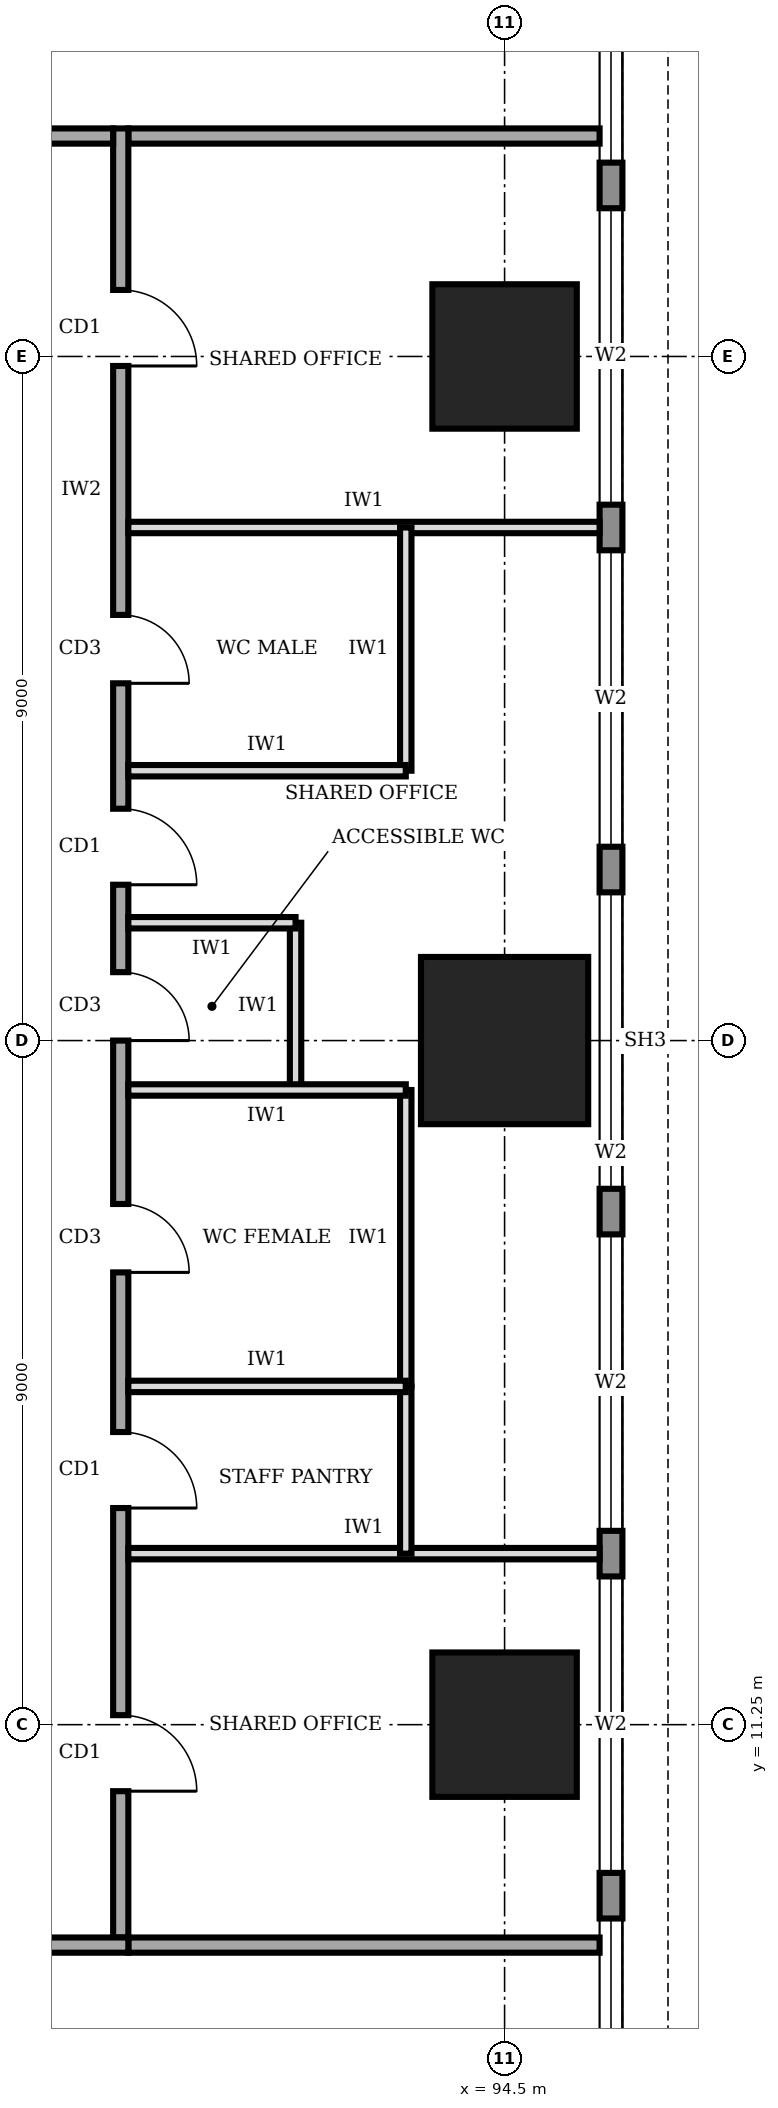
"""IFC4 building model, lengths in metres.
Left out: names, types, materials, properties, quantities, classifications, styles, units other than length and angle.
Written with IfcOpenShell. Run it as: python <this file> out.ifc"""

import sys

from ifc_helpers import new_model, si_unit, direction, frame, frame_2d, origin, origin_2d, place, context, subcontext, project, spatial, rectangle, extrude, element, fill, save


model = new_model("IFC4")
c1 = context("Model", 3, precision=1e-05, world=origin(), true_north=direction((0.0, 1.0)))
c2 = subcontext(c1, "Body", "Model", "MODEL_VIEW")
j1 = project(units=[si_unit("LENGTHUNIT", "METRE"), si_unit("PLANEANGLEUNIT", "RADIAN")], contexts=[c1])
p1 = place(None, origin())
s1 = spatial("IfcSite", under=j1, at=p1, CompositionType="ELEMENT")
p2 = place(p1, origin())
s2 = spatial("IfcBuilding", under=s1, at=p2, CompositionType="ELEMENT")
p3 = place(p2, frame((0.0, 0.0, 153.0)))
s3 = spatial("IfcBuildingStorey", under=s2, at=p3, CompositionType="ELEMENT", Elevation=153.0)
p4 = place(p3, frame((94.5, 11.25, 0.0), z_axis=(0.0, 0.0, 1.0), x_axis=(1.0, 0.0, 0.0)))
e1 = element("IfcColumn", 1, at=p4, inside=s3, PredefinedType="COLUMN", context=c2, shape_type="SweptSolid", body=[
    extrude(rectangle(XDim=1.9, YDim=1.9, at=origin_2d()), origin(), (0.0, 0.0, 1.0), 4.0),
])
p5 = place(p3, frame((94.5, 20.25, 0.0), z_axis=(0.0, 0.0, 1.0), x_axis=(1.0, 0.0, 0.0)))
e2 = element("IfcColumn", 2, at=p5, inside=s3, PredefinedType="COLUMN", context=c2, shape_type="SweptSolid", body=[
    extrude(rectangle(XDim=2.2, YDim=2.2, at=origin_2d()), origin(), (0.0, 0.0, 1.0), 4.0),
])
p6 = place(p3, frame((94.5, 29.25, 0.0), z_axis=(0.0, 0.0, 1.0), x_axis=(1.0, 0.0, 0.0)))
e3 = element("IfcColumn", 3, at=p6, inside=s3, PredefinedType="COLUMN", context=c2, shape_type="SweptSolid", body=[
    extrude(rectangle(XDim=1.9, YDim=1.9, at=origin_2d()), origin(), (0.0, 0.0, 1.0), 4.0),
])
p7 = place(p3, frame((95.9, 3.32, 0.0), z_axis=(0.0, 0.0, 1.0), x_axis=(0.0, 1.0, 0.0)))
e4 = element("IfcWall", 4, at=p7, inside=s3, PredefinedType="STANDARD", context=c2, shape_type="SweptSolid", body=[
    extrude(rectangle(XDim=33.86, YDim=0.3, at=frame_2d((16.93, 0.0))), origin(), (0.0, 0.0, 1.0), 3.75),
])
p8 = place(p7, frame((1.48, 0.0, 0.6)))
e5 = element("IfcOpeningElement", 5, at=p8, cuts=e4, PredefinedType="OPENING", context=c2, shape_type="SweptSolid", body=[
    extrude(rectangle(XDim=3.9, YDim=2.6, at=frame_2d((1.95, 1.3))), frame((0.0, 0.16, 0.0), z_axis=(0.0, -1.0, 0.0), x_axis=(1.0, 0.0, 0.0)), (0.0, 0.0, 1.0), 0.32),
])
p9 = place(p7, frame((5.98, 0.0, 0.6)))
e6 = element("IfcOpeningElement", 6, at=p9, cuts=e4, PredefinedType="OPENING", context=c2, shape_type="SweptSolid", body=[
    extrude(rectangle(XDim=3.9, YDim=2.6, at=frame_2d((1.95, 1.3))), frame((0.0, 0.16, 0.0), z_axis=(0.0, -1.0, 0.0), x_axis=(1.0, 0.0, 0.0)), (0.0, 0.0, 1.0), 0.32),
])
p10 = place(p7, frame((10.48, 0.0, 0.6)))
e7 = element("IfcOpeningElement", 7, at=p10, cuts=e4, PredefinedType="OPENING", context=c2, shape_type="SweptSolid", body=[
    extrude(rectangle(XDim=3.9, YDim=2.6, at=frame_2d((1.95, 1.3))), frame((0.0, 0.16, 0.0), z_axis=(0.0, -1.0, 0.0), x_axis=(1.0, 0.0, 0.0)), (0.0, 0.0, 1.0), 0.32),
])
p11 = place(p7, frame((14.98, 0.0, 0.6)))
e8 = element("IfcOpeningElement", 8, at=p11, cuts=e4, PredefinedType="OPENING", context=c2, shape_type="SweptSolid", body=[
    extrude(rectangle(XDim=3.9, YDim=2.6, at=frame_2d((1.95, 1.3))), frame((0.0, 0.16, 0.0), z_axis=(0.0, -1.0, 0.0), x_axis=(1.0, 0.0, 0.0)), (0.0, 0.0, 1.0), 0.32),
])
p12 = place(p7, frame((19.48, 0.0, 0.6)))
e9 = element("IfcOpeningElement", 9, at=p12, cuts=e4, PredefinedType="OPENING", context=c2, shape_type="SweptSolid", body=[
    extrude(rectangle(XDim=3.9, YDim=2.6, at=frame_2d((1.95, 1.3))), frame((0.0, 0.16, 0.0), z_axis=(0.0, -1.0, 0.0), x_axis=(1.0, 0.0, 0.0)), (0.0, 0.0, 1.0), 0.32),
])
p13 = place(p7, frame((23.98, 0.0, 0.6)))
e10 = element("IfcOpeningElement", 10, at=p13, cuts=e4, PredefinedType="OPENING", context=c2, shape_type="SweptSolid", body=[
    extrude(rectangle(XDim=3.9, YDim=2.6, at=frame_2d((1.95, 1.3))), frame((0.0, 0.16, 0.0), z_axis=(0.0, -1.0, 0.0), x_axis=(1.0, 0.0, 0.0)), (0.0, 0.0, 1.0), 0.32),
])
p14 = place(p7, frame((28.48, 0.0, 0.6)))
e11 = element("IfcOpeningElement", 11, at=p14, cuts=e4, PredefinedType="OPENING", context=c2, shape_type="SweptSolid", body=[
    extrude(rectangle(XDim=3.9, YDim=2.6, at=frame_2d((1.95, 1.3))), frame((0.0, 0.16, 0.0), z_axis=(0.0, -1.0, 0.0), x_axis=(1.0, 0.0, 0.0)), (0.0, 0.0, 1.0), 0.32),
])
p15 = place(p3, frame((63.3, 8.35, 0.0), z_axis=(0.0, 0.0, 1.0), x_axis=(1.0, 0.0, 0.0)))
e12 = element("IfcWall", 12, at=p15, inside=s3, PredefinedType="SOLIDWALL", context=c2, shape_type="SweptSolid", body=[
    extrude(rectangle(XDim=26.25, YDim=0.2, at=frame_2d((13.125, 0.0))), origin(), (0.0, 0.0, 1.0), 3.75),
])
p16 = place(p15, frame((6.0, 0.0, 0.0)))
e13 = element("IfcOpeningElement", 13, at=p16, cuts=e12, PredefinedType="OPENING", context=c2, shape_type="SweptSolid", body=[
    extrude(rectangle(XDim=1.0, YDim=2.1, at=frame_2d((0.5, 1.05))), frame((0.0, 0.11, 0.0), z_axis=(0.0, -1.0, 0.0), x_axis=(1.0, 0.0, 0.0)), (0.0, 0.0, 1.0), 0.22),
])
p17 = place(p15, frame((19.325, 0.0, 0.0)))
e14 = element("IfcOpeningElement", 14, at=p17, cuts=e12, PredefinedType="OPENING", context=c2, shape_type="SweptSolid", body=[
    extrude(rectangle(XDim=1.0, YDim=2.1, at=frame_2d((0.5, 1.05))), frame((0.0, 0.11, 0.0), z_axis=(0.0, -1.0, 0.0), x_axis=(1.0, 0.0, 0.0)), (0.0, 0.0, 1.0), 0.22),
])
p18 = place(p3, frame((89.45, 8.45, 0.0), z_axis=(0.0, 0.0, 1.0), x_axis=(0.0, 1.0, 0.0)))
e15 = element("IfcWall", 15, at=p18, inside=s3, PredefinedType="SOLIDWALL", context=c2, shape_type="SweptSolid", body=[
    extrude(rectangle(XDim=23.8, YDim=0.2, at=frame_2d((11.9, 0.0))), origin(), (0.0, 0.0, 1.0), 3.75),
])
p19 = place(p18, frame((1.925, 0.0, 0.0)))
e16 = element("IfcOpeningElement", 16, at=p19, cuts=e15, PredefinedType="OPENING", context=c2, shape_type="SweptSolid", body=[
    extrude(rectangle(XDim=1.0, YDim=2.1, at=frame_2d((0.5, 1.05))), frame((0.0, 0.11, 0.0), z_axis=(0.0, -1.0, 0.0), x_axis=(1.0, 0.0, 0.0)), (0.0, 0.0, 1.0), 0.22),
])
p20 = place(p18, frame((5.65, 0.0, 0.0)))
e17 = element("IfcOpeningElement", 17, at=p20, cuts=e15, PredefinedType="OPENING", context=c2, shape_type="SweptSolid", body=[
    extrude(rectangle(XDim=1.0, YDim=2.1, at=frame_2d((0.5, 1.05))), frame((0.0, 0.11, 0.0), z_axis=(0.0, -1.0, 0.0), x_axis=(1.0, 0.0, 0.0)), (0.0, 0.0, 1.0), 0.22),
])
p21 = place(p18, frame((8.75, 0.0, 0.0)))
e18 = element("IfcOpeningElement", 18, at=p21, cuts=e15, PredefinedType="OPENING", context=c2, shape_type="SweptSolid", body=[
    extrude(rectangle(XDim=0.9, YDim=2.1, at=frame_2d((0.45, 1.05))), frame((0.0, 0.11, 0.0), z_axis=(0.0, -1.0, 0.0), x_axis=(1.0, 0.0, 0.0)), (0.0, 0.0, 1.0), 0.22),
])
p22 = place(p18, frame((11.8, 0.0, 0.0)))
e19 = element("IfcOpeningElement", 19, at=p22, cuts=e15, PredefinedType="OPENING", context=c2, shape_type="SweptSolid", body=[
    extrude(rectangle(XDim=0.9, YDim=2.1, at=frame_2d((0.45, 1.05))), frame((0.0, 0.11, 0.0), z_axis=(0.0, -1.0, 0.0), x_axis=(1.0, 0.0, 0.0)), (0.0, 0.0, 1.0), 0.22),
])
p23 = place(p18, frame((16.5, 0.0, 0.0)))
e20 = element("IfcOpeningElement", 20, at=p23, cuts=e15, PredefinedType="OPENING", context=c2, shape_type="SweptSolid", body=[
    extrude(rectangle(XDim=0.9, YDim=2.1, at=frame_2d((0.45, 1.05))), frame((0.0, 0.11, 0.0), z_axis=(0.0, -1.0, 0.0), x_axis=(1.0, 0.0, 0.0)), (0.0, 0.0, 1.0), 0.22),
])
p24 = place(p18, frame((13.85, 0.0, 0.0)))
e21 = element("IfcOpeningElement", 21, at=p24, cuts=e15, PredefinedType="OPENING", context=c2, shape_type="SweptSolid", body=[
    extrude(rectangle(XDim=1.0, YDim=2.1, at=frame_2d((0.5, 1.05))), frame((0.0, 0.11, 0.0), z_axis=(0.0, -1.0, 0.0), x_axis=(1.0, 0.0, 0.0)), (0.0, 0.0, 1.0), 0.22),
])
p25 = place(p18, frame((20.675, 0.0, 0.0)))
e22 = element("IfcOpeningElement", 22, at=p25, cuts=e15, PredefinedType="OPENING", context=c2, shape_type="SweptSolid", body=[
    extrude(rectangle(XDim=1.0, YDim=2.1, at=frame_2d((0.5, 1.05))), frame((0.0, 0.11, 0.0), z_axis=(0.0, -1.0, 0.0), x_axis=(1.0, 0.0, 0.0)), (0.0, 0.0, 1.0), 0.22),
])
p26 = place(p3, frame((89.35, 32.15, 0.0), z_axis=(0.0, 0.0, 1.0), x_axis=(-1.0, 0.0, 0.0)))
e23 = element("IfcWall", 23, at=p26, inside=s3, PredefinedType="SOLIDWALL", context=c2, shape_type="SweptSolid", body=[
    extrude(rectangle(XDim=26.05, YDim=0.2, at=frame_2d((13.025, 0.0))), origin(), (0.0, 0.0, 1.0), 3.75),
])
p27 = place(p26, frame((16.4, 0.0, 0.0)))
e24 = element("IfcOpeningElement", 24, at=p27, cuts=e23, PredefinedType="OPENING", context=c2, shape_type="SweptSolid", body=[
    extrude(rectangle(XDim=1.8, YDim=2.1, at=frame_2d((0.9, 1.05))), frame((0.0, 0.11, 0.0), z_axis=(0.0, -1.0, 0.0), x_axis=(1.0, 0.0, 0.0)), (0.0, 0.0, 1.0), 0.22),
])
p28 = place(p26, frame((5.6, 0.0, 0.0)))
e25 = element("IfcOpeningElement", 25, at=p28, cuts=e23, PredefinedType="OPENING", context=c2, shape_type="SweptSolid", body=[
    extrude(rectangle(XDim=1.0, YDim=2.1, at=frame_2d((0.5, 1.05))), frame((0.0, 0.11, 0.0), z_axis=(0.0, -1.0, 0.0), x_axis=(1.0, 0.0, 0.0)), (0.0, 0.0, 1.0), 0.22),
])
p29 = place(p26, frame((1.325, 0.0, 0.0)))
e26 = element("IfcOpeningElement", 26, at=p29, cuts=e23, PredefinedType="OPENING", context=c2, shape_type="SweptSolid", body=[
    extrude(rectangle(XDim=1.0, YDim=2.1, at=frame_2d((0.5, 1.05))), frame((0.0, 0.11, 0.0), z_axis=(0.0, -1.0, 0.0), x_axis=(1.0, 0.0, 0.0)), (0.0, 0.0, 1.0), 0.22),
])
for number, where, z_axis, x_axis in (
    (27, (89.55, 8.35, 0.0), (0.0, 0.0, 1.0), (1.0, 0.0, 0.0)),
    (28, (89.55, 32.15, 0.0), (0.0, 0.0, 1.0), (1.0, 0.0, 0.0)),
):
    element("IfcWall", number, at=place(p3, frame(where, z_axis=z_axis, x_axis=x_axis)), inside=s3, PredefinedType="SOLIDWALL", context=c2, shape_type="SweptSolid", body=[
        extrude(rectangle(XDim=6.2, YDim=0.2, at=frame_2d((3.1, 0.0))), origin(), (0.0, 0.0, 1.0), 3.75),
    ])
for number, where, z_axis, x_axis in (
    (29, (89.55, 13.5, 0.0), (0.0, 0.0, 1.0), (1.0, 0.0, 0.0)),
    (30, (89.55, 27.0, 0.0), (0.0, 0.0, 1.0), (1.0, 0.0, 0.0)),
):
    element("IfcWall", number, at=place(p3, frame(where, z_axis=z_axis, x_axis=x_axis)), inside=s3, PredefinedType="PARTITIONING", context=c2, shape_type="SweptSolid", body=[
        extrude(rectangle(XDim=6.2, YDim=0.15, at=frame_2d((3.1, 0.0))), origin(), (0.0, 0.0, 1.0), 3.75),
    ])
p30 = place(p3, frame((89.55, 15.7, 0.0), z_axis=(0.0, 0.0, 1.0), x_axis=(1.0, 0.0, 0.0)))
e31 = element("IfcWall", 31, at=p30, inside=s3, PredefinedType="PARTITIONING", context=c2, shape_type="SweptSolid", body=[
    extrude(rectangle(XDim=3.65, YDim=0.15, at=frame_2d((1.825, 0.0))), origin(), (0.0, 0.0, 1.0), 3.75),
])
p31 = place(p3, frame((89.55, 19.6, 0.0), z_axis=(0.0, 0.0, 1.0), x_axis=(1.0, 0.0, 0.0)))
e32 = element("IfcWall", 32, at=p31, inside=s3, PredefinedType="PARTITIONING", context=c2, shape_type="SweptSolid", body=[
    extrude(rectangle(XDim=3.65, YDim=0.15, at=frame_2d((1.825, 0.0))), origin(), (0.0, 0.0, 1.0), 2.85),
])
p32 = place(p3, frame((89.55, 21.8, 0.0), z_axis=(0.0, 0.0, 1.0), x_axis=(1.0, 0.0, 0.0)))
e33 = element("IfcWall", 33, at=p32, inside=s3, PredefinedType="PARTITIONING", context=c2, shape_type="SweptSolid", body=[
    extrude(rectangle(XDim=2.2, YDim=0.15, at=frame_2d((1.1, 0.0))), origin(), (0.0, 0.0, 1.0), 3.75),
])
p33 = place(p3, frame((89.55, 23.8, 0.0), z_axis=(0.0, 0.0, 1.0), x_axis=(1.0, 0.0, 0.0)))
e34 = element("IfcWall", 34, at=p33, inside=s3, PredefinedType="PARTITIONING", context=c2, shape_type="SweptSolid", body=[
    extrude(rectangle(XDim=3.65, YDim=0.15, at=frame_2d((1.825, 0.0))), origin(), (0.0, 0.0, 1.0), 3.75),
])
p34 = place(p3, frame((93.2, 13.5, 0.0), z_axis=(0.0, 0.0, 1.0), x_axis=(0.0, 1.0, 0.0)))
e35 = element("IfcWall", 35, at=p34, inside=s3, PredefinedType="PARTITIONING", context=c2, shape_type="SweptSolid", body=[
    extrude(rectangle(XDim=2.2, YDim=0.15, at=frame_2d((1.1, 0.0))), origin(), (0.0, 0.0, 1.0), 3.75),
])
p35 = place(p3, frame((93.2, 15.7, 0.0), z_axis=(0.0, 0.0, 1.0), x_axis=(0.0, 1.0, 0.0)))
e36 = element("IfcWall", 36, at=p35, inside=s3, PredefinedType="PARTITIONING", context=c2, shape_type="SweptSolid", body=[
    extrude(rectangle(XDim=3.9, YDim=0.15, at=frame_2d((1.95, 0.0))), origin(), (0.0, 0.0, 1.0), 3.75),
])
p36 = place(p3, frame((91.75, 19.6, 0.0), z_axis=(0.0, 0.0, 1.0), x_axis=(0.0, 1.0, 0.0)))
e37 = element("IfcWall", 37, at=p36, inside=s3, PredefinedType="PARTITIONING", context=c2, shape_type="SweptSolid", body=[
    extrude(rectangle(XDim=2.2, YDim=0.15, at=frame_2d((1.1, 0.0))), origin(), (0.0, 0.0, 1.0), 3.75),
])
p37 = place(p3, frame((93.2, 23.8, 0.0), z_axis=(0.0, 0.0, 1.0), x_axis=(0.0, 1.0, 0.0)))
e38 = element("IfcWall", 38, at=p37, inside=s3, PredefinedType="PARTITIONING", context=c2, shape_type="SweptSolid", body=[
    extrude(rectangle(XDim=3.2, YDim=0.15, at=frame_2d((1.6, 0.0))), origin(), (0.0, 0.0, 1.0), 3.75),
])
p38 = place(p8, origin())
e39 = element("IfcWindow", 39, at=p38, inside=s3, PartitioningType="SINGLE_PANEL", PredefinedType="WINDOW", context=c2, shape_type="SweptSolid", body=[
    extrude(rectangle(XDim=3.9, YDim=2.6, at=frame_2d((1.95, 1.3))), frame((0.0, 0.03, 0.0), z_axis=(0.0, -1.0, 0.0), x_axis=(1.0, 0.0, 0.0)), (0.0, 0.0, 1.0), 0.06),
])
fill(e5, e39)
p39 = place(p9, origin())
e40 = element("IfcWindow", 40, at=p39, inside=s3, PartitioningType="SINGLE_PANEL", PredefinedType="WINDOW", context=c2, shape_type="SweptSolid", body=[
    extrude(rectangle(XDim=3.9, YDim=2.6, at=frame_2d((1.95, 1.3))), frame((0.0, 0.03, 0.0), z_axis=(0.0, -1.0, 0.0), x_axis=(1.0, 0.0, 0.0)), (0.0, 0.0, 1.0), 0.06),
])
fill(e6, e40)
p40 = place(p10, origin())
e41 = element("IfcWindow", 41, at=p40, inside=s3, PartitioningType="SINGLE_PANEL", PredefinedType="WINDOW", context=c2, shape_type="SweptSolid", body=[
    extrude(rectangle(XDim=3.9, YDim=2.6, at=frame_2d((1.95, 1.3))), frame((0.0, 0.03, 0.0), z_axis=(0.0, -1.0, 0.0), x_axis=(1.0, 0.0, 0.0)), (0.0, 0.0, 1.0), 0.06),
])
fill(e7, e41)
p41 = place(p11, origin())
e42 = element("IfcWindow", 42, at=p41, inside=s3, PartitioningType="SINGLE_PANEL", PredefinedType="WINDOW", context=c2, shape_type="SweptSolid", body=[
    extrude(rectangle(XDim=3.9, YDim=2.6, at=frame_2d((1.95, 1.3))), frame((0.0, 0.03, 0.0), z_axis=(0.0, -1.0, 0.0), x_axis=(1.0, 0.0, 0.0)), (0.0, 0.0, 1.0), 0.06),
])
fill(e8, e42)
p42 = place(p12, origin())
e43 = element("IfcWindow", 43, at=p42, inside=s3, PartitioningType="SINGLE_PANEL", PredefinedType="WINDOW", context=c2, shape_type="SweptSolid", body=[
    extrude(rectangle(XDim=3.9, YDim=2.6, at=frame_2d((1.95, 1.3))), frame((0.0, 0.03, 0.0), z_axis=(0.0, -1.0, 0.0), x_axis=(1.0, 0.0, 0.0)), (0.0, 0.0, 1.0), 0.06),
])
fill(e9, e43)
p43 = place(p13, origin())
e44 = element("IfcWindow", 44, at=p43, inside=s3, PartitioningType="SINGLE_PANEL", PredefinedType="WINDOW", context=c2, shape_type="SweptSolid", body=[
    extrude(rectangle(XDim=3.9, YDim=2.6, at=frame_2d((1.95, 1.3))), frame((0.0, 0.03, 0.0), z_axis=(0.0, -1.0, 0.0), x_axis=(1.0, 0.0, 0.0)), (0.0, 0.0, 1.0), 0.06),
])
fill(e10, e44)
p44 = place(p14, origin())
e45 = element("IfcWindow", 45, at=p44, inside=s3, PartitioningType="SINGLE_PANEL", PredefinedType="WINDOW", context=c2, shape_type="SweptSolid", body=[
    extrude(rectangle(XDim=3.9, YDim=2.6, at=frame_2d((1.95, 1.3))), frame((0.0, 0.03, 0.0), z_axis=(0.0, -1.0, 0.0), x_axis=(1.0, 0.0, 0.0)), (0.0, 0.0, 1.0), 0.06),
])
fill(e11, e45)
p45 = place(p19, frame((1.0, 0.0, 0.0), z_axis=(0.0, 0.0, 1.0), x_axis=(-1.0, 0.0, 0.0)))
e46 = element("IfcDoor", 46, at=p45, inside=s3, OperationType="SINGLE_SWING_RIGHT", PredefinedType="DOOR", context=c2, shape_type="SweptSolid", body=[
    extrude(rectangle(XDim=1.0, YDim=2.1, at=frame_2d((0.5, 1.05))), frame((0.0, 0.025, 0.0), z_axis=(0.0, -1.0, 0.0), x_axis=(1.0, 0.0, 0.0)), (0.0, 0.0, 1.0), 0.05),
])
fill(e16, e46)
p46 = place(p20, frame((1.0, 0.0, 0.0), z_axis=(0.0, 0.0, 1.0), x_axis=(-1.0, 0.0, 0.0)))
e47 = element("IfcDoor", 47, at=p46, inside=s3, OperationType="SINGLE_SWING_RIGHT", PredefinedType="DOOR", context=c2, shape_type="SweptSolid", body=[
    extrude(rectangle(XDim=1.0, YDim=2.1, at=frame_2d((0.5, 1.05))), frame((0.0, 0.025, 0.0), z_axis=(0.0, -1.0, 0.0), x_axis=(1.0, 0.0, 0.0)), (0.0, 0.0, 1.0), 0.05),
])
fill(e17, e47)
p47 = place(p21, frame((0.9, 0.0, 0.0), z_axis=(0.0, 0.0, 1.0), x_axis=(-1.0, 0.0, 0.0)))
e48 = element("IfcDoor", 48, at=p47, inside=s3, OperationType="SINGLE_SWING_RIGHT", PredefinedType="DOOR", context=c2, shape_type="SweptSolid", body=[
    extrude(rectangle(XDim=0.9, YDim=2.1, at=frame_2d((0.45, 1.05))), frame((0.0, 0.025, 0.0), z_axis=(0.0, -1.0, 0.0), x_axis=(1.0, 0.0, 0.0)), (0.0, 0.0, 1.0), 0.05),
])
fill(e18, e48)
p48 = place(p22, frame((0.9, 0.0, 0.0), z_axis=(0.0, 0.0, 1.0), x_axis=(-1.0, 0.0, 0.0)))
e49 = element("IfcDoor", 49, at=p48, inside=s3, OperationType="SINGLE_SWING_RIGHT", PredefinedType="DOOR", context=c2, shape_type="SweptSolid", body=[
    extrude(rectangle(XDim=0.9, YDim=2.1, at=frame_2d((0.45, 1.05))), frame((0.0, 0.025, 0.0), z_axis=(0.0, -1.0, 0.0), x_axis=(1.0, 0.0, 0.0)), (0.0, 0.0, 1.0), 0.05),
])
fill(e19, e49)
p49 = place(p23, frame((0.9, 0.0, 0.0), z_axis=(0.0, 0.0, 1.0), x_axis=(-1.0, 0.0, 0.0)))
e50 = element("IfcDoor", 50, at=p49, inside=s3, OperationType="SINGLE_SWING_RIGHT", PredefinedType="DOOR", context=c2, shape_type="SweptSolid", body=[
    extrude(rectangle(XDim=0.9, YDim=2.1, at=frame_2d((0.45, 1.05))), frame((0.0, 0.025, 0.0), z_axis=(0.0, -1.0, 0.0), x_axis=(1.0, 0.0, 0.0)), (0.0, 0.0, 1.0), 0.05),
])
fill(e20, e50)
p50 = place(p24, frame((1.0, 0.0, 0.0), z_axis=(0.0, 0.0, 1.0), x_axis=(-1.0, 0.0, 0.0)))
e51 = element("IfcDoor", 51, at=p50, inside=s3, OperationType="SINGLE_SWING_RIGHT", PredefinedType="DOOR", context=c2, shape_type="SweptSolid", body=[
    extrude(rectangle(XDim=1.0, YDim=2.1, at=frame_2d((0.5, 1.05))), frame((0.0, 0.025, 0.0), z_axis=(0.0, -1.0, 0.0), x_axis=(1.0, 0.0, 0.0)), (0.0, 0.0, 1.0), 0.05),
])
fill(e21, e51)
p51 = place(p25, frame((1.0, 0.0, 0.0), z_axis=(0.0, 0.0, 1.0), x_axis=(-1.0, 0.0, 0.0)))
e52 = element("IfcDoor", 52, at=p51, inside=s3, OperationType="SINGLE_SWING_RIGHT", PredefinedType="DOOR", context=c2, shape_type="SweptSolid", body=[
    extrude(rectangle(XDim=1.0, YDim=2.1, at=frame_2d((0.5, 1.05))), frame((0.0, 0.025, 0.0), z_axis=(0.0, -1.0, 0.0), x_axis=(1.0, 0.0, 0.0)), (0.0, 0.0, 1.0), 0.05),
])
fill(e22, e52)
save(model, sys.argv[1])
